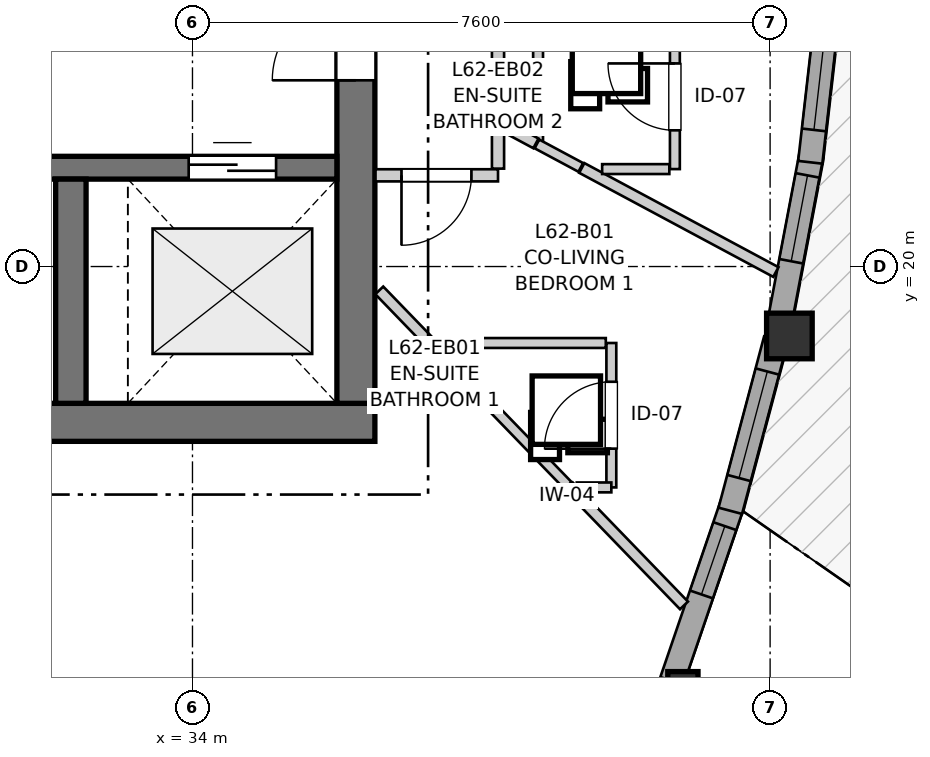
"""IFC4 building model, lengths in metres.
Left out: names, types, materials, properties, quantities, classifications, styles, units other than length and angle.
Written with IfcOpenShell. Run it as: python <this file> out.ifc"""

import sys

from ifc_helpers import new_model, si_unit, direction, frame, frame_2d, origin, origin_2d, place, context, subcontext, project, spatial, rectangle, i_section, extrude, source, transform, mapped, element, fill, save


model = new_model("IFC4")
c1 = context("Model", 3, precision=1e-05, world=origin(), true_north=direction((0.0, 1.0)))
c2 = subcontext(c1, "Body", "Model", "MODEL_VIEW")
j1 = project(units=[si_unit("LENGTHUNIT", "METRE"), si_unit("PLANEANGLEUNIT", "RADIAN")], contexts=[c1])
p1 = place(None, origin())
s1 = spatial("IfcSite", under=j1, at=p1, CompositionType="ELEMENT")
p2 = place(p1, origin())
s2 = spatial("IfcBuilding", under=s1, at=p2, CompositionType="ELEMENT")
p3 = place(p2, frame((0.0, 0.0, 208.4)))
s3 = spatial("IfcBuildingStorey", under=s2, at=p3, CompositionType="ELEMENT", Elevation=208.4)
p4 = place(p3, frame((24.3, 17.95, 0.0), z_axis=(0.0, 0.0, 1.0), x_axis=(1.0, 0.0, 0.0)))
e1 = element("IfcWall", 1, at=p4, inside=s3, PredefinedType="SHEAR", context=c2, shape_type="SweptSolid", body=[
    extrude(rectangle(XDim=12.1, YDim=0.5, at=frame_2d((6.05, 0.0))), origin(), (0.0, 0.0, 1.0), 2.935),
])
p5 = place(p3, frame((36.15, 18.2, 0.0), z_axis=(0.0, 0.0, 1.0), x_axis=(0.0, 1.0, 0.0)))
e2 = element("IfcWall", 2, at=p5, inside=s3, PredefinedType="SHEAR", context=c2, shape_type="SweptSolid", body=[
    extrude(rectangle(XDim=15.6, YDim=0.5, at=frame_2d((7.8, 0.0))), origin(), (0.0, 0.0, 1.0), 2.935),
])
p6 = place(p5, frame((4.25, 0.0, 0.0)))
e3 = element("IfcOpeningElement", 3, at=p6, cuts=e2, PredefinedType="OPENING", context=c2, shape_type="SweptSolid", body=[
    extrude(rectangle(XDim=1.1, YDim=2.15, at=frame_2d((0.55, 1.075))), frame((0.0, 0.26, 0.0), z_axis=(0.0, -1.0, 0.0), x_axis=(1.0, 0.0, 0.0)), (0.0, 0.0, 1.0), 0.52),
])
p7 = place(p5, frame((10.25, 0.0, 0.0)))
e4 = element("IfcOpeningElement", 4, at=p7, cuts=e2, PredefinedType="OPENING", context=c2, shape_type="SweptSolid", body=[
    extrude(rectangle(XDim=1.1, YDim=2.15, at=frame_2d((0.55, 1.075))), frame((0.0, 0.26, 0.0), z_axis=(0.0, -1.0, 0.0), x_axis=(1.0, 0.0, 0.0)), (0.0, 0.0, 1.0), 0.52),
])
p8 = place(p3, frame((24.8, 21.3, 0.0), z_axis=(0.0, 0.0, 1.0), x_axis=(1.0, 0.0, 0.0)))
e5 = element("IfcWall", 5, at=p8, inside=s3, PredefinedType="SHEAR", context=c2, shape_type="SweptSolid", body=[
    extrude(rectangle(XDim=11.1, YDim=0.3, at=frame_2d((5.55, 0.0))), origin(), (0.0, 0.0, 1.0), 2.935),
])
p9 = place(p8, frame((6.22, 0.0, 0.0)))
e6 = element("IfcOpeningElement", 6, at=p9, cuts=e5, PredefinedType="OPENING", context=c2, shape_type="SweptSolid", body=[
    extrude(rectangle(XDim=0.98, YDim=2.15, at=frame_2d((0.49, 1.075))), frame((0.0, 0.16, 0.0), z_axis=(0.0, -1.0, 0.0), x_axis=(1.0, 0.0, 0.0)), (0.0, 0.0, 1.0), 0.32),
])
p10 = place(p8, frame((9.15, 0.0, 0.0)))
e7 = element("IfcOpeningElement", 7, at=p10, cuts=e5, PredefinedType="OPENING", context=c2, shape_type="SweptSolid", body=[
    extrude(rectangle(XDim=1.15, YDim=2.15, at=frame_2d((0.575, 1.075))), frame((0.0, 0.16, 0.0), z_axis=(0.0, -1.0, 0.0), x_axis=(1.0, 0.0, 0.0)), (0.0, 0.0, 1.0), 0.32),
])
p11 = place(p3, frame((32.4, 18.2, 0.0), z_axis=(0.0, 0.0, 1.0), x_axis=(0.0, 1.0, 0.0)))
e8 = element("IfcWall", 8, at=p11, inside=s3, PredefinedType="SHEAR", context=c2, shape_type="SweptSolid", body=[
    extrude(rectangle(XDim=2.95, YDim=0.4, at=frame_2d((1.475, 0.0))), origin(), (0.0, 0.0, 1.0), 2.935),
])
m1 = source(origin(), c2, "Body", "SweptSolid", [
    extrude(i_section(OverallWidth=0.398, OverallDepth=0.387, WebThickness=0.019, FlangeThickness=0.03, FilletRadius=0.015, at=origin_2d()), origin(), (0.0, 0.0, 1.0), 2.935),
])
p12 = place(p3, frame((40.452, 14.478, 0.0), z_axis=(0.0, 0.0, 1.0), x_axis=(1.0, 0.0, 0.0)))
e9 = element("IfcColumn", 9, at=p12, inside=s3, PredefinedType="PILASTER", context=c2, shape_type="MappedRepresentation", body=[
    mapped(m1, transform((0.0, 0.0, 0.0), x_axis=(1.0, 0.0, 0.0), y_axis=(0.0, 1.0, 0.0), z_axis=(0.0, 0.0, 1.0), scale=1.0)),
])
m2 = source(origin(), c2, "Body", "SweptSolid", [
    extrude(rectangle(XDim=0.6, YDim=0.6, at=origin_2d()), origin(), (0.0, 0.0, 1.0), 2.935),
])
p13 = place(p3, frame((41.854, 19.086, 0.0), z_axis=(0.0, 0.0, 1.0), x_axis=(1.0, 0.0, 0.0)))
e10 = element("IfcColumn", 10, at=p13, inside=s3, PredefinedType="COLUMN", context=c2, shape_type="MappedRepresentation", body=[
    mapped(m2, transform((0.0, 0.0, 0.0), x_axis=(1.0, 0.0, 0.0), y_axis=(0.0, 1.0, 0.0), z_axis=(0.0, 0.0, 1.0), scale=1.0)),
])
p14 = place(p3, frame((40.308, 14.548, 0.0), z_axis=(0.0, 0.0, 1.0), x_axis=(0.323591564922, 0.946196860654, 0.0)))
e11 = element("IfcWall", 11, at=p14, inside=s3, PredefinedType="SOLIDWALL", context=c2, shape_type="SweptSolid", body=[
    extrude(rectangle(XDim=2.454, YDim=0.32, at=frame_2d((1.227, 0.0))), origin(), (0.0, 0.0, 1.0), 2.555),
])
p15 = place(p14, frame((1.202, 0.0, 0.82)))
e12 = element("IfcOpeningElement", 12, at=p15, cuts=e11, PredefinedType="OPENING", context=c2, shape_type="SweptSolid", body=[
    extrude(rectangle(XDim=0.95, YDim=1.35, at=frame_2d((0.475, 0.675))), frame((0.0, 0.17, 0.0), z_axis=(0.0, -1.0, 0.0), x_axis=(1.0, 0.0, 0.0)), (0.0, 0.0, 1.0), 0.34),
])
p16 = place(p3, frame((41.076, 16.786, 0.0), z_axis=(0.0, 0.0, 1.0), x_axis=(0.257037260973, 0.966401493413, 0.0)))
e13 = element("IfcWall", 13, at=p16, inside=s3, PredefinedType="SOLIDWALL", context=c2, shape_type="SweptSolid", body=[
    extrude(rectangle(XDim=2.333, YDim=0.32, at=frame_2d((1.167, 0.0))), origin(), (0.0, 0.0, 1.0), 2.555),
])
p17 = place(p16, frame((0.446, 0.0, 0.82)))
e14 = element("IfcOpeningElement", 14, at=p17, cuts=e13, PredefinedType="OPENING", context=c2, shape_type="SweptSolid", body=[
    extrude(rectangle(XDim=1.45, YDim=1.25, at=frame_2d((0.725, 0.625))), frame((0.0, 0.17, 0.0), z_axis=(0.0, -1.0, 0.0), x_axis=(1.0, 0.0, 0.0)), (0.0, 0.0, 1.0), 0.34),
])
p18 = place(p3, frame((41.713, 19.205, 0.0), z_axis=(0.0, 0.0, 1.0), x_axis=(0.186691464441, 0.982418595663, 0.0)))
e15 = element("IfcWall", 15, at=p18, inside=s3, PredefinedType="SOLIDWALL", context=c2, shape_type="SweptSolid", body=[
    extrude(rectangle(XDim=2.294, YDim=0.32, at=frame_2d((1.147, 0.0))), origin(), (0.0, 0.0, 1.0), 2.555),
])
p19 = place(p18, frame((0.88, 0.0, 0.82)))
e16 = element("IfcOpeningElement", 16, at=p19, cuts=e15, PredefinedType="OPENING", context=c2, shape_type="SweptSolid", body=[
    extrude(rectangle(XDim=1.15, YDim=1.2, at=frame_2d((0.575, 0.6))), frame((0.0, 0.17, 0.0), z_axis=(0.0, -1.0, 0.0), x_axis=(1.0, 0.0, 0.0)), (0.0, 0.0, 1.0), 0.34),
])
p20 = place(p3, frame((42.128, 21.371, 0.0), z_axis=(0.0, 0.0, 1.0), x_axis=(0.113319777802, 0.993558567956, 0.0)))
e17 = element("IfcWall", 17, at=p20, inside=s3, PredefinedType="SOLIDWALL", context=c2, shape_type="SweptSolid", body=[
    extrude(rectangle(XDim=2.338, YDim=0.32, at=frame_2d((1.169, 0.0))), origin(), (0.0, 0.0, 1.0), 2.555),
])
p21 = place(p20, frame((0.429, 0.0, 0.82)))
e18 = element("IfcOpeningElement", 18, at=p21, cuts=e17, PredefinedType="OPENING", context=c2, shape_type="SweptSolid", body=[
    extrude(rectangle(XDim=1.5, YDim=1.45, at=frame_2d((0.75, 0.725))), frame((0.0, 0.17, 0.0), z_axis=(0.0, -1.0, 0.0), x_axis=(1.0, 0.0, 0.0)), (0.0, 0.0, 1.0), 0.34),
])
p22 = place(p3, frame((38.02, 25.733, 0.0), z_axis=(0.0, 0.0, 1.0), x_axis=(0.0, -1.0, 0.0)))
e19 = element("IfcWall", 19, at=p22, inside=s3, PredefinedType="PARTITIONING", context=c2, shape_type="SweptSolid", body=[
    extrude(rectangle(XDim=3.862, YDim=0.16, at=frame_2d((1.931, 0.0))), origin(), (0.0, 0.0, 1.0), 2.935),
])
p23 = place(p22, frame((1.47, 0.0, 0.0)))
e20 = element("IfcOpeningElement", 20, at=p23, cuts=e19, PredefinedType="OPENING", context=c2, shape_type="SweptSolid", body=[
    extrude(rectangle(XDim=0.92, YDim=2.1, at=frame_2d((0.46, 1.05))), frame((0.0, 0.09, 0.0), z_axis=(0.0, -1.0, 0.0), x_axis=(1.0, 0.0, 0.0)), (0.0, 0.0, 1.0), 0.18),
])
p24 = place(p3, frame((39.511, 17.094, 0.0), z_axis=(0.0, 0.0, 1.0), x_axis=(0.0, 1.0, 0.0)))
e21 = element("IfcWall", 21, at=p24, inside=s3, PredefinedType="PARTITIONING", context=c2, shape_type="SweptSolid", body=[
    extrude(rectangle(XDim=1.9, YDim=0.13, at=frame_2d((0.95, 0.0))), origin(), (0.0, 0.0, 1.0), 2.935),
])
p25 = place(p24, frame((0.51, 0.0, 0.0)))
e22 = element("IfcOpeningElement", 22, at=p25, cuts=e21, PredefinedType="OPENING", context=c2, shape_type="SweptSolid", body=[
    extrude(rectangle(XDim=0.88, YDim=2.05, at=frame_2d((0.44, 1.025))), frame((0.0, 0.075, 0.0), z_axis=(0.0, -1.0, 0.0), x_axis=(1.0, 0.0, 0.0)), (0.0, 0.0, 1.0), 0.15),
])
p26 = place(p3, frame((40.347, 21.282, 0.0), z_axis=(0.0, 0.0, 1.0), x_axis=(0.0, 1.0, 0.0)))
e23 = element("IfcWall", 23, at=p26, inside=s3, PredefinedType="PARTITIONING", context=c2, shape_type="SweptSolid", body=[
    extrude(rectangle(XDim=1.9, YDim=0.13, at=frame_2d((0.95, 0.0))), origin(), (0.0, 0.0, 1.0), 2.573),
])
p27 = place(p26, frame((0.51, 0.0, 0.0)))
e24 = element("IfcOpeningElement", 24, at=p27, cuts=e23, PredefinedType="OPENING", context=c2, shape_type="SweptSolid", body=[
    extrude(rectangle(XDim=0.88, YDim=2.05, at=frame_2d((0.44, 1.025))), frame((0.0, 0.075, 0.0), z_axis=(0.0, -1.0, 0.0), x_axis=(1.0, 0.0, 0.0)), (0.0, 0.0, 1.0), 0.15),
])
p28 = place(p3, frame((38.02, 21.2, 0.0), z_axis=(0.0, 0.0, 1.0), x_axis=(-1.0, 0.0, 0.0)))
e25 = element("IfcWall", 25, at=p28, inside=s3, PredefinedType="PARTITIONING", context=c2, shape_type="SweptSolid", body=[
    extrude(rectangle(XDim=1.612, YDim=0.16, at=frame_2d((0.806, 0.0))), origin(), (0.0, 0.0, 1.0), 2.935),
])
p29 = place(p28, frame((0.35, 0.0, 0.0)))
e26 = element("IfcOpeningElement", 26, at=p29, cuts=e25, PredefinedType="OPENING", context=c2, shape_type="SweptSolid", body=[
    extrude(rectangle(XDim=0.92, YDim=2.1, at=frame_2d((0.46, 1.05))), frame((0.0, 0.09, 0.0), z_axis=(0.0, -1.0, 0.0), x_axis=(1.0, 0.0, 0.0)), (0.0, 0.0, 1.0), 0.18),
])
p30 = place(p3, frame((39.122, 21.297, 0.0), z_axis=(0.0, 0.0, 1.0), x_axis=(0.881308328415, -0.472541670402, 0.0)))
e27 = element("IfcWall", 27, at=p30, inside=s3, PredefinedType="PARTITIONING", context=c2, shape_type="SweptSolid", body=[
    extrude(rectangle(XDim=2.898, YDim=0.145, at=frame_2d((1.449, 0.0))), origin(), (0.0, 0.0, 1.0), 2.935),
])
p31 = place(p3, frame((38.951, 17.109, 0.0), z_axis=(0.0, 0.0, 1.0), x_axis=(0.695195716836, -0.718820502833, 0.0)))
e28 = element("IfcWall", 28, at=p31, inside=s3, PredefinedType="PARTITIONING", context=c2, shape_type="SweptSolid", body=[
    extrude(rectangle(XDim=2.18, YDim=0.145, at=frame_2d((1.09, 0.0))), origin(), (0.0, 0.0, 1.0), 2.935),
])
p32 = place(p3, frame((36.458, 19.686, 0.0), z_axis=(0.0, 0.0, 1.0), x_axis=(0.695231916786, -0.718785490868, 0.0)))
e29 = element("IfcWall", 29, at=p32, inside=s3, PredefinedType="PARTITIONING", context=c2, shape_type="SweptSolid", body=[
    extrude(rectangle(XDim=1.824, YDim=0.145, at=frame_2d((0.912, 0.0))), origin(), (0.0, 0.0, 1.0), 2.935),
])
p33 = place(p3, frame((37.711, 18.994, 0.0), z_axis=(0.0, 0.0, 1.0), x_axis=(1.0, 0.0, 0.0)))
e30 = element("IfcWall", 30, at=p33, inside=s3, PredefinedType="PARTITIONING", context=c2, shape_type="SweptSolid", body=[
    extrude(rectangle(XDim=1.727, YDim=0.13, at=frame_2d((0.864, 0.0))), origin(), (0.0, 0.0, 1.0), 2.935),
])
p34 = place(p3, frame((37.736, 18.364, 0.0), z_axis=(0.0, 0.0, 1.0), x_axis=(0.695451956037, -0.718572596781, 0.0)))
e31 = element("IfcWall", 31, at=p34, inside=s3, PredefinedType="PARTITIONING", context=c2, shape_type="SweptSolid", body=[
    extrude(rectangle(XDim=1.732, YDim=0.13, at=frame_2d((0.866, 0.0))), origin(), (0.0, 0.0, 1.0), 2.935),
])
p35 = place(p3, frame((38.547, 21.605, 0.0), z_axis=(0.0, 0.0, 1.0), x_axis=(0.0, 1.0, 0.0)))
e32 = element("IfcWall", 32, at=p35, inside=s3, PredefinedType="PARTITIONING", context=c2, shape_type="SweptSolid", body=[
    extrude(rectangle(XDim=1.504, YDim=0.13, at=frame_2d((0.752, 0.0))), origin(), (0.0, 0.0, 1.0), 2.603),
])
p36 = place(p3, frame((39.39, 21.282, 0.0), z_axis=(0.0, 0.0, 1.0), x_axis=(1.0, 0.0, 0.0)))
e33 = element("IfcWall", 33, at=p36, inside=s3, PredefinedType="PARTITIONING", context=c2, shape_type="SweptSolid", body=[
    extrude(rectangle(XDim=0.884, YDim=0.13, at=frame_2d((0.442, 0.0))), origin(), (0.0, 0.0, 1.0), 2.935),
])
p37 = place(p3, frame((38.02, 21.288, 0.0), z_axis=(0.0, 0.0, 1.0), x_axis=(0.0, 1.0, 0.0)))
e34 = element("IfcWall", 34, at=p37, inside=s3, PredefinedType="PARTITIONING", context=c2, shape_type="SweptSolid", body=[
    extrude(rectangle(XDim=0.568, YDim=0.16, at=frame_2d((0.284, 0.0))), origin(), (0.0, 0.0, 1.0), 2.935),
])
p38 = place(p3, frame((38.532, 21.613, 0.0), z_axis=(0.0, 0.0, 1.0), x_axis=(0.881618593919, -0.471962556626, 0.0)))
e35 = element("IfcWall", 35, at=p38, inside=s3, PredefinedType="PARTITIONING", context=c2, shape_type="SweptSolid", body=[
    extrude(rectangle(XDim=0.654, YDim=0.13, at=frame_2d((0.327, 0.0))), origin(), (0.0, 0.0, 1.0), 2.935),
])
p39 = place(p3, frame((37.711, 18.571, 0.0), z_axis=(0.0, 0.0, 1.0), x_axis=(0.0, 1.0, 0.0)))
e36 = element("IfcWall", 36, at=p39, inside=s3, PredefinedType="PARTITIONING", context=c2, shape_type="SweptSolid", body=[
    extrude(rectangle(XDim=0.35, YDim=0.13, at=frame_2d((0.175, 0.0))), origin(), (0.0, 0.0, 1.0), 2.935),
])
p40 = place(p3, frame((38.06, 21.867, 0.0), z_axis=(0.0, 0.0, 1.0), x_axis=(0.881026965879, -0.473066047601, 0.0)))
e37 = element("IfcWall", 37, at=p40, inside=s3, PredefinedType="PARTITIONING", context=c2, shape_type="SweptSolid", body=[
    extrude(rectangle(XDim=0.521, YDim=0.145, at=frame_2d((0.261, 0.0))), origin(), (0.0, 0.0, 1.0), 2.935),
])
p41 = place(p3, frame((39.056, 17.094, 0.0), z_axis=(0.0, 0.0, 1.0), x_axis=(1.0, 0.0, 0.0)))
e38 = element("IfcWall", 38, at=p41, inside=s3, PredefinedType="PARTITIONING", context=c2, shape_type="SweptSolid", body=[
    extrude(rectangle(XDim=0.455, YDim=0.13, at=frame_2d((0.228, 0.0))), origin(), (0.0, 0.0, 1.0), 2.935),
])
m3 = source(origin(), c2, "Body", "SweptSolid", [
    extrude(rectangle(XDim=0.95, YDim=1.35, at=frame_2d((0.475, 0.675))), frame((0.0, 0.03, 0.0), z_axis=(0.0, -1.0, 0.0), x_axis=(1.0, 0.0, 0.0)), (0.0, 0.0, 1.0), 0.06),
])
p42 = place(p15, origin())
e39 = element("IfcWindow", 39, at=p42, inside=s3, PartitioningType="SINGLE_PANEL", PredefinedType="WINDOW", context=c2, shape_type="MappedRepresentation", body=[
    mapped(m3, transform((0.0, 0.0, 0.0), x_axis=(1.0, 0.0, 0.0), y_axis=(0.0, 1.0, 0.0), z_axis=(0.0, 0.0, 1.0), scale=1.0)),
])
fill(e12, e39)
m4 = source(origin(), c2, "Body", "SweptSolid", [
    extrude(rectangle(XDim=1.45, YDim=1.25, at=frame_2d((0.725, 0.625))), frame((0.0, 0.03, 0.0), z_axis=(0.0, -1.0, 0.0), x_axis=(1.0, 0.0, 0.0)), (0.0, 0.0, 1.0), 0.06),
])
p43 = place(p17, origin())
e40 = element("IfcWindow", 40, at=p43, inside=s3, PartitioningType="SINGLE_PANEL", PredefinedType="WINDOW", context=c2, shape_type="MappedRepresentation", body=[
    mapped(m4, transform((0.0, 0.0, 0.0), x_axis=(1.0, 0.0, 0.0), y_axis=(0.0, 1.0, 0.0), z_axis=(0.0, 0.0, 1.0), scale=1.0)),
])
fill(e14, e40)
m5 = source(origin(), c2, "Body", "SweptSolid", [
    extrude(rectangle(XDim=1.15, YDim=1.2, at=frame_2d((0.575, 0.6))), frame((0.0, 0.03, 0.0), z_axis=(0.0, -1.0, 0.0), x_axis=(1.0, 0.0, 0.0)), (0.0, 0.0, 1.0), 0.06),
])
p44 = place(p19, origin())
e41 = element("IfcWindow", 41, at=p44, inside=s3, PartitioningType="SINGLE_PANEL", PredefinedType="WINDOW", context=c2, shape_type="MappedRepresentation", body=[
    mapped(m5, transform((0.0, 0.0, 0.0), x_axis=(1.0, 0.0, 0.0), y_axis=(0.0, 1.0, 0.0), z_axis=(0.0, 0.0, 1.0), scale=1.0)),
])
fill(e16, e41)
m6 = source(origin(), c2, "Body", "SweptSolid", [
    extrude(rectangle(XDim=1.5, YDim=1.45, at=frame_2d((0.75, 0.725))), frame((0.0, 0.03, 0.0), z_axis=(0.0, -1.0, 0.0), x_axis=(1.0, 0.0, 0.0)), (0.0, 0.0, 1.0), 0.06),
])
p45 = place(p21, origin())
e42 = element("IfcWindow", 42, at=p45, inside=s3, PartitioningType="SINGLE_PANEL", PredefinedType="WINDOW", context=c2, shape_type="MappedRepresentation", body=[
    mapped(m6, transform((0.0, 0.0, 0.0), x_axis=(1.0, 0.0, 0.0), y_axis=(0.0, 1.0, 0.0), z_axis=(0.0, 0.0, 1.0), scale=1.0)),
])
fill(e18, e42)
m7 = source(origin(), c2, "Body", "SweptSolid", [
    extrude(rectangle(XDim=1.15, YDim=2.15, at=frame_2d((0.575, 1.075))), frame((0.0, 0.025, 0.0), z_axis=(0.0, -1.0, 0.0), x_axis=(1.0, 0.0, 0.0)), (0.0, 0.0, 1.0), 0.05),
])
p46 = place(p10, origin())
e43 = element("IfcDoor", 43, at=p46, inside=s3, OperationType="DOUBLE_DOOR_SLIDING", PredefinedType="DOOR", context=c2, shape_type="MappedRepresentation", body=[
    mapped(m7, transform((0.0, 0.0, 0.0), x_axis=(1.0, 0.0, 0.0), y_axis=(0.0, 1.0, 0.0), z_axis=(0.0, 0.0, 1.0), scale=1.0)),
])
fill(e7, e43)
m8 = source(origin(), c2, "Body", "SweptSolid", [
    extrude(rectangle(XDim=1.1, YDim=2.15, at=frame_2d((0.55, 1.075))), frame((0.0, 0.025, 0.0), z_axis=(0.0, -1.0, 0.0), x_axis=(1.0, 0.0, 0.0)), (0.0, 0.0, 1.0), 0.05),
])
p47 = place(p6, origin())
e44 = element("IfcDoor", 44, at=p47, inside=s3, OperationType="SINGLE_SWING_LEFT", PredefinedType="DOOR", context=c2, shape_type="MappedRepresentation", body=[
    mapped(m8, transform((0.0, 0.0, 0.0), x_axis=(1.0, 0.0, 0.0), y_axis=(0.0, 1.0, 0.0), z_axis=(0.0, 0.0, 1.0), scale=1.0)),
])
fill(e3, e44)
m9 = source(origin(), c2, "Body", "SweptSolid", [
    extrude(rectangle(XDim=0.88, YDim=2.05, at=frame_2d((0.44, 1.025))), frame((0.0, 0.025, 0.0), z_axis=(0.0, -1.0, 0.0), x_axis=(1.0, 0.0, 0.0)), (0.0, 0.0, 1.0), 0.05),
])
p48 = place(p25, origin())
e45 = element("IfcDoor", 45, at=p48, inside=s3, OperationType="SINGLE_SWING_LEFT", PredefinedType="DOOR", context=c2, shape_type="MappedRepresentation", body=[
    mapped(m9, transform((0.0, 0.0, 0.0), x_axis=(1.0, 0.0, 0.0), y_axis=(0.0, 1.0, 0.0), z_axis=(0.0, 0.0, 1.0), scale=1.0)),
])
fill(e22, e45)
p49 = place(p27, origin())
e46 = element("IfcDoor", 46, at=p49, inside=s3, OperationType="SINGLE_SWING_RIGHT", PredefinedType="DOOR", context=c2, shape_type="MappedRepresentation", body=[
    mapped(m9, transform((0.0, 0.0, 0.0), x_axis=(1.0, 0.0, 0.0), y_axis=(0.0, 1.0, 0.0), z_axis=(0.0, 0.0, 1.0), scale=1.0)),
])
fill(e24, e46)
m10 = source(origin(), c2, "Body", "SweptSolid", [
    extrude(rectangle(XDim=0.92, YDim=2.1, at=frame_2d((0.46, 1.05))), frame((0.0, 0.025, 0.0), z_axis=(0.0, -1.0, 0.0), x_axis=(1.0, 0.0, 0.0)), (0.0, 0.0, 1.0), 0.05),
])
p50 = place(p29, origin())
e47 = element("IfcDoor", 47, at=p50, inside=s3, OperationType="SINGLE_SWING_RIGHT", PredefinedType="DOOR", context=c2, shape_type="MappedRepresentation", body=[
    mapped(m10, transform((0.0, 0.0, 0.0), x_axis=(1.0, 0.0, 0.0), y_axis=(0.0, 1.0, 0.0), z_axis=(0.0, 0.0, 1.0), scale=1.0)),
])
fill(e26, e47)
save(model, sys.argv[1])
